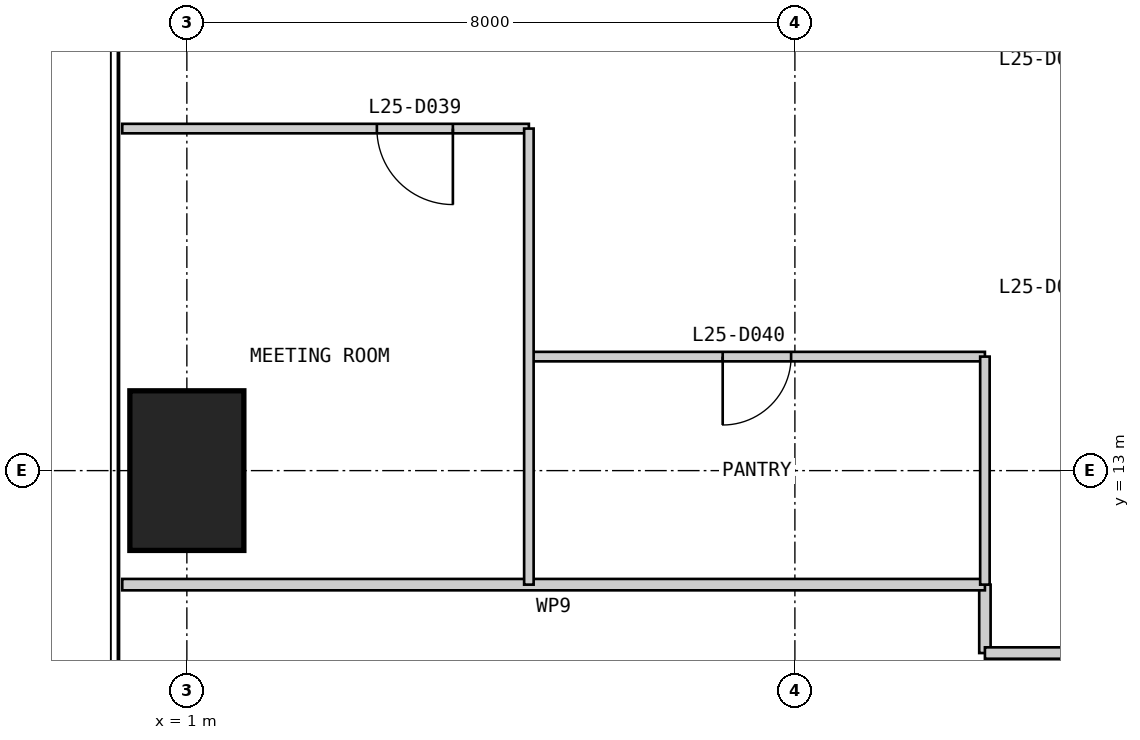
"""IFC4 building model, lengths in metres.
Left out: names, types, materials, properties, quantities, classifications, styles, units other than length and angle.
Written with IfcOpenShell. Run it as: python <this file> out.ifc"""

import sys

from ifc_helpers import new_model, si_unit, direction, frame, frame_2d, origin, origin_2d, place, context, subcontext, project, spatial, rectangle, extrude, element, fill, save


model = new_model("IFC4")
c1 = context("Model", 3, precision=1e-05, world=origin(), true_north=direction((0.0, 1.0)))
c2 = subcontext(c1, "Body", "Model", "MODEL_VIEW")
j1 = project(units=[si_unit("LENGTHUNIT", "METRE"), si_unit("PLANEANGLEUNIT", "RADIAN")], contexts=[c1])
p1 = place(None, origin())
s1 = spatial("IfcSite", under=j1, at=p1, CompositionType="ELEMENT")
p2 = place(p1, origin())
s2 = spatial("IfcBuilding", under=s1, at=p2, CompositionType="ELEMENT")
p3 = place(p2, frame((0.0, 0.0, 110.4)))
s3 = spatial("IfcBuildingStorey", under=s2, at=p3, CompositionType="ELEMENT", Elevation=110.4)
p4 = place(p3, frame((1.0, 13.0, 0.0), z_axis=(0.0, 0.0, 1.0), x_axis=(1.0, 0.0, 0.0)))
e1 = element("IfcColumn", 1, at=p4, inside=s3, PredefinedType="COLUMN", context=c2, shape_type="SweptSolid", body=[
    extrude(rectangle(XDim=1.5, YDim=2.1, at=origin_2d()), origin(), (0.0, 0.0, 1.0), 4.0),
])
p5 = place(p3, frame((11.5, 11.5, 0.0), z_axis=(0.0, 0.0, 1.0), x_axis=(0.0, -1.0, 0.0)))
e2 = element("IfcWall", 2, at=p5, inside=s3, PredefinedType="PARTITIONING", context=c2, shape_type="SweptSolid", body=[
    extrude(rectangle(XDim=0.9, YDim=0.15, at=frame_2d((0.45, 0.0))), origin(), (0.0, 0.0, 1.0), 3.85),
])
p6 = place(p3, frame((11.5, 10.6, 0.0), z_axis=(0.0, 0.0, 1.0), x_axis=(1.0, 0.0, 0.0)))
e3 = element("IfcWall", 3, at=p6, inside=s3, PredefinedType="PARTITIONING", context=c2, shape_type="SweptSolid", body=[
    extrude(rectangle(XDim=27.9, YDim=0.15, at=frame_2d((13.95, 0.0))), origin(), (0.0, 0.0, 1.0), 3.85),
])
p7 = place(p6, frame((12.25, 0.0, 0.0)))
e4 = element("IfcOpeningElement", 4, at=p7, cuts=e3, PredefinedType="OPENING", context=c2, shape_type="SweptSolid", body=[
    extrude(rectangle(XDim=1.0, YDim=2.2, at=frame_2d((0.5, 1.1))), frame((0.0, 0.085, 0.0), z_axis=(0.0, -1.0, 0.0), x_axis=(1.0, 0.0, 0.0)), (0.0, 0.0, 1.0), 0.17),
])
p8 = place(p3, frame((0.15, 11.5, 0.0), z_axis=(0.0, 0.0, 1.0), x_axis=(1.0, 0.0, 0.0)))
e5 = element("IfcWall", 5, at=p8, inside=s3, PredefinedType="PARTITIONING", context=c2, shape_type="SweptSolid", body=[
    extrude(rectangle(XDim=11.35, YDim=0.15, at=frame_2d((5.675, 0.0))), origin(), (0.0, 0.0, 1.0), 3.85),
])
p9 = place(p3, frame((0.15, 17.5, 0.0), z_axis=(0.0, 0.0, 1.0), x_axis=(1.0, 0.0, 0.0)))
e6 = element("IfcWall", 6, at=p9, inside=s3, PredefinedType="PARTITIONING", context=c2, shape_type="SweptSolid", body=[
    extrude(rectangle(XDim=5.35, YDim=0.125, at=frame_2d((2.675, 0.0))), origin(), (0.0, 0.0, 1.0), 3.85),
])
p10 = place(p9, frame((3.35, 0.0, 0.0)))
e7 = element("IfcOpeningElement", 7, at=p10, cuts=e6, PredefinedType="OPENING", context=c2, shape_type="SweptSolid", body=[
    extrude(rectangle(XDim=1.0, YDim=2.2, at=frame_2d((0.5, 1.1))), frame((0.0, 0.073, 0.0), z_axis=(0.0, -1.0, 0.0), x_axis=(1.0, 0.0, 0.0)), (0.0, 0.0, 1.0), 0.145),
])
p11 = place(p3, frame((5.5, 14.5, 0.0), z_axis=(0.0, 0.0, 1.0), x_axis=(1.0, 0.0, 0.0)))
e8 = element("IfcWall", 8, at=p11, inside=s3, PredefinedType="PARTITIONING", context=c2, shape_type="SweptSolid", body=[
    extrude(rectangle(XDim=6.0, YDim=0.125, at=frame_2d((3.0, 0.0))), origin(), (0.0, 0.0, 1.0), 3.85),
])
p12 = place(p11, frame((2.55, 0.0, 0.0)))
e9 = element("IfcOpeningElement", 9, at=p12, cuts=e8, PredefinedType="OPENING", context=c2, shape_type="SweptSolid", body=[
    extrude(rectangle(XDim=0.9, YDim=2.2, at=frame_2d((0.45, 1.1))), frame((0.0, 0.073, 0.0), z_axis=(0.0, -1.0, 0.0), x_axis=(1.0, 0.0, 0.0)), (0.0, 0.0, 1.0), 0.145),
])
p13 = place(p3, frame((5.5, 17.5, 0.0), z_axis=(0.0, 0.0, 1.0), x_axis=(0.0, -1.0, 0.0)))
e10 = element("IfcWall", 10, at=p13, inside=s3, PredefinedType="PARTITIONING", context=c2, shape_type="SweptSolid", body=[
    extrude(rectangle(XDim=6.0, YDim=0.125, at=frame_2d((3.0, 0.0))), origin(), (0.0, 0.0, 1.0), 3.85),
])
p14 = place(p3, frame((11.5, 14.5, 0.0), z_axis=(0.0, 0.0, 1.0), x_axis=(0.0, -1.0, 0.0)))
e11 = element("IfcWall", 11, at=p14, inside=s3, PredefinedType="PARTITIONING", context=c2, shape_type="SweptSolid", body=[
    extrude(rectangle(XDim=3.0, YDim=0.125, at=frame_2d((1.5, 0.0))), origin(), (0.0, 0.0, 1.0), 3.85),
])
p15 = place(p10, frame((1.0, 0.0, 0.0), z_axis=(0.0, 0.0, 1.0), x_axis=(-1.0, 0.0, 0.0)))
e12 = element("IfcDoor", 12, at=p15, inside=s3, OperationType="SINGLE_SWING_LEFT", PredefinedType="DOOR", context=c2, shape_type="SweptSolid", body=[
    extrude(rectangle(XDim=1.0, YDim=2.2, at=frame_2d((0.5, 1.1))), frame((0.0, 0.025, 0.0), z_axis=(0.0, -1.0, 0.0), x_axis=(1.0, 0.0, 0.0)), (0.0, 0.0, 1.0), 0.05),
])
fill(e7, e12)
p16 = place(p12, frame((0.9, 0.0, 0.0), z_axis=(0.0, 0.0, 1.0), x_axis=(-1.0, 0.0, 0.0)))
e13 = element("IfcDoor", 13, at=p16, inside=s3, OperationType="SINGLE_SWING_RIGHT", PredefinedType="DOOR", context=c2, shape_type="SweptSolid", body=[
    extrude(rectangle(XDim=0.9, YDim=2.2, at=frame_2d((0.45, 1.1))), frame((0.0, 0.025, 0.0), z_axis=(0.0, -1.0, 0.0), x_axis=(1.0, 0.0, 0.0)), (0.0, 0.0, 1.0), 0.05),
])
fill(e9, e13)
save(model, sys.argv[1])
